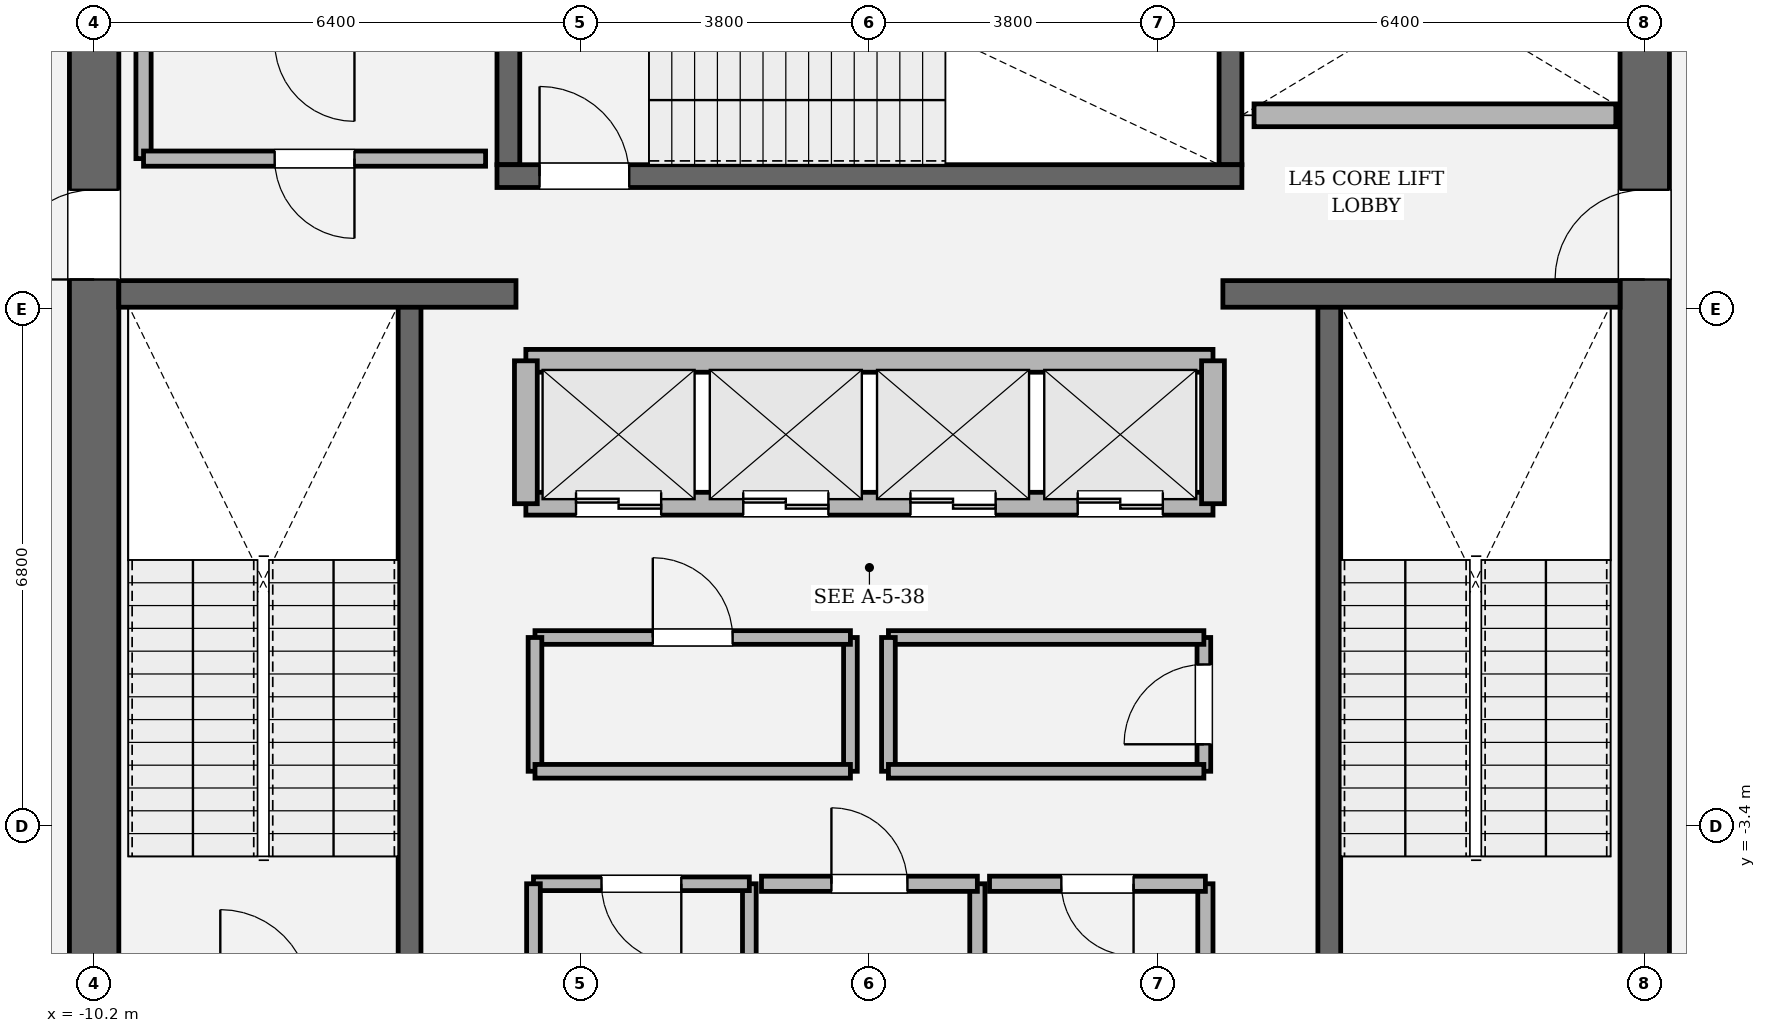
"""IFC4 building model, lengths in metres.
Left out: names, types, materials, properties, quantities, classifications, styles, units other than length and angle.
Written with IfcOpenShell. Run it as: python <this file> out.ifc"""

import sys

from ifc_helpers import new_model, si_unit, direction, frame, frame_2d, origin, place, context, subcontext, project, spatial, rectangle, extrude, element, fill, save


model = new_model("IFC4")
c1 = context("Model", 3, precision=1e-05, world=origin(), true_north=direction((0.0, 1.0)))
c2 = subcontext(c1, "Body", "Model", "MODEL_VIEW")
j1 = project(units=[si_unit("LENGTHUNIT", "METRE"), si_unit("PLANEANGLEUNIT", "RADIAN")], contexts=[c1])
p1 = place(None, origin())
s1 = spatial("IfcSite", under=j1, at=p1, CompositionType="ELEMENT")
p2 = place(p1, origin())
s2 = spatial("IfcBuilding", under=s1, at=p2, CompositionType="ELEMENT")
p3 = place(p2, frame((0.0, 0.0, 192.45)))
s3 = spatial("IfcBuildingStorey", under=s2, at=p3, CompositionType="ELEMENT", Elevation=192.45)
p4 = place(p3, frame((-10.2, -8.875, 0.0), z_axis=(0.0, 0.0, 1.0), x_axis=(0.0, 1.0, 0.0)))
e1 = element("IfcWall", 1, at=p4, inside=s3, PredefinedType="SHEAR", context=c2, shape_type="SweptSolid", body=[
    extrude(rectangle(XDim=17.75, YDim=0.65, at=frame_2d((8.875, 0.0))), origin(), (0.0, 0.0, 1.0), 4.05),
])
p5 = place(p4, frame((12.665, 0.0, 0.0)))
e2 = element("IfcOpeningElement", 2, at=p5, cuts=e1, PredefinedType="OPENING", context=c2, shape_type="SweptSolid", body=[
    extrude(rectangle(XDim=1.18, YDim=2.2, at=frame_2d((0.59, 1.1))), frame((0.0, 0.335, 0.0), z_axis=(0.0, -1.0, 0.0), x_axis=(1.0, 0.0, 0.0)), (0.0, 0.0, 1.0), 0.67),
])
p6 = place(p3, frame((10.2, 8.875, 0.0), z_axis=(0.0, 0.0, 1.0), x_axis=(0.0, -1.0, 0.0)))
e3 = element("IfcWall", 3, at=p6, inside=s3, PredefinedType="SHEAR", context=c2, shape_type="SweptSolid", body=[
    extrude(rectangle(XDim=17.75, YDim=0.65, at=frame_2d((8.875, 0.0))), origin(), (0.0, 0.0, 1.0), 4.05),
])
p7 = place(p6, frame((3.905, 0.0, 0.0)))
e4 = element("IfcOpeningElement", 4, at=p7, cuts=e3, PredefinedType="OPENING", context=c2, shape_type="SweptSolid", body=[
    extrude(rectangle(XDim=1.18, YDim=2.2, at=frame_2d((0.59, 1.1))), frame((0.0, 0.335, 0.0), z_axis=(0.0, -1.0, 0.0), x_axis=(1.0, 0.0, 0.0)), (0.0, 0.0, 1.0), 0.67),
])
for number, where, z_axis, x_axis in (
    (5, (-6.05, -5.5, 0.0), (0.0, 0.0, 1.0), (0.0, 1.0, 0.0)),
    (6, (6.05, 3.45, 0.0), (0.0, 0.0, 1.0), (0.0, -1.0, 0.0)),
):
    element("IfcWall", number, at=place(p3, frame(where, z_axis=z_axis, x_axis=x_axis)), inside=s3, PredefinedType="SOLIDWALL", context=c2, shape_type="SweptSolid", body=[
        extrude(rectangle(XDim=8.95, YDim=0.3, at=frame_2d((4.475, 0.0))), origin(), (0.0, 0.0, 1.0), 4.05),
    ])
for number, where, z_axis, x_axis in (
    (7, (-4.75, 5.3, 0.0), (0.0, 0.0, 1.0), (0.0, 1.0, 0.0)),
    (8, (4.75, 8.875, 0.0), (0.0, 0.0, 1.0), (0.0, -1.0, 0.0)),
):
    element("IfcWall", number, at=place(p3, frame(where, z_axis=z_axis, x_axis=x_axis)), inside=s3, PredefinedType="SOLIDWALL", context=c2, shape_type="SweptSolid", body=[
        extrude(rectangle(XDim=3.575, YDim=0.3, at=frame_2d((1.788, 0.0))), origin(), (0.0, 0.0, 1.0), 4.05),
    ])
p8 = place(p3, frame((-4.9, 5.15, 0.0), z_axis=(0.0, 0.0, 1.0), x_axis=(1.0, 0.0, 0.0)))
e9 = element("IfcWall", 9, at=p8, inside=s3, PredefinedType="SOLIDWALL", context=c2, shape_type="SweptSolid", body=[
    extrude(rectangle(XDim=9.8, YDim=0.3, at=frame_2d((4.9, 0.0))), origin(), (0.0, 0.0, 1.0), 4.05),
])
p9 = place(p8, frame((0.56, 0.0, 0.0)))
e10 = element("IfcOpeningElement", 10, at=p9, cuts=e9, PredefinedType="OPENING", context=c2, shape_type="SweptSolid", body=[
    extrude(rectangle(XDim=1.18, YDim=2.2, at=frame_2d((0.59, 1.1))), frame((0.0, 0.16, 0.0), z_axis=(0.0, -1.0, 0.0), x_axis=(1.0, 0.0, 0.0)), (0.0, 0.0, 1.0), 0.32),
])
for number, where, z_axis, x_axis in (
    (11, (-9.875, 3.6, 0.0), (0.0, 0.0, 1.0), (1.0, 0.0, 0.0)),
    (12, (4.65, 3.6, 0.0), (0.0, 0.0, 1.0), (1.0, 0.0, 0.0)),
):
    element("IfcWall", number, at=place(p3, frame(where, z_axis=z_axis, x_axis=x_axis)), inside=s3, PredefinedType="SOLIDWALL", context=c2, shape_type="SweptSolid", body=[
        extrude(rectangle(XDim=5.225, YDim=0.35, at=frame_2d((2.613, 0.0))), origin(), (0.0, 0.0, 1.0), 4.05),
    ])
p10 = place(p3, frame((-4.52, 0.84, 0.0), z_axis=(0.0, 0.0, 1.0), x_axis=(1.0, 0.0, 0.0)))
e13 = element("IfcWall", 13, at=p10, inside=s3, PredefinedType="SOLIDWALL", context=c2, shape_type="SweptSolid", body=[
    extrude(rectangle(XDim=9.04, YDim=0.3, at=frame_2d((4.52, 0.0))), origin(), (0.0, 0.0, 1.0), 3.83),
])
p11 = place(p10, frame((0.66, 0.0, 0.0)))
e14 = element("IfcOpeningElement", 14, at=p11, cuts=e13, PredefinedType="OPENING", context=c2, shape_type="SweptSolid", body=[
    extrude(rectangle(XDim=1.12, YDim=2.25, at=frame_2d((0.56, 1.125))), frame((0.0, 0.16, 0.0), z_axis=(0.0, -1.0, 0.0), x_axis=(1.0, 0.0, 0.0)), (0.0, 0.0, 1.0), 0.32),
])
p12 = place(p10, frame((2.86, 0.0, 0.0)))
e15 = element("IfcOpeningElement", 15, at=p12, cuts=e13, PredefinedType="OPENING", context=c2, shape_type="SweptSolid", body=[
    extrude(rectangle(XDim=1.12, YDim=2.25, at=frame_2d((0.56, 1.125))), frame((0.0, 0.16, 0.0), z_axis=(0.0, -1.0, 0.0), x_axis=(1.0, 0.0, 0.0)), (0.0, 0.0, 1.0), 0.32),
])
p13 = place(p10, frame((5.06, 0.0, 0.0)))
e16 = element("IfcOpeningElement", 16, at=p13, cuts=e13, PredefinedType="OPENING", context=c2, shape_type="SweptSolid", body=[
    extrude(rectangle(XDim=1.12, YDim=2.25, at=frame_2d((0.56, 1.125))), frame((0.0, 0.16, 0.0), z_axis=(0.0, -1.0, 0.0), x_axis=(1.0, 0.0, 0.0)), (0.0, 0.0, 1.0), 0.32),
])
p14 = place(p10, frame((7.26, 0.0, 0.0)))
e17 = element("IfcOpeningElement", 17, at=p14, cuts=e13, PredefinedType="OPENING", context=c2, shape_type="SweptSolid", body=[
    extrude(rectangle(XDim=1.12, YDim=2.25, at=frame_2d((0.56, 1.125))), frame((0.0, 0.16, 0.0), z_axis=(0.0, -1.0, 0.0), x_axis=(1.0, 0.0, 0.0)), (0.0, 0.0, 1.0), 0.32),
])
p15 = place(p3, frame((-4.52, 2.72, 0.0), z_axis=(0.0, 0.0, 1.0), x_axis=(1.0, 0.0, 0.0)))
e18 = element("IfcWall", 18, at=p15, inside=s3, PredefinedType="SOLIDWALL", context=c2, shape_type="SweptSolid", body=[
    extrude(rectangle(XDim=9.04, YDim=0.3, at=frame_2d((4.52, 0.0))), origin(), (0.0, 0.0, 1.0), 3.83),
])
for number, where, z_axis, x_axis in (
    (19, (-4.52, 0.84, 0.0), (0.0, 0.0, 1.0), (0.0, 1.0, 0.0)),
    (20, (4.52, 0.84, 0.0), (0.0, 0.0, 1.0), (0.0, 1.0, 0.0)),
):
    element("IfcWall", number, at=place(p3, frame(where, z_axis=z_axis, x_axis=x_axis)), inside=s3, PredefinedType="SOLIDWALL", context=c2, shape_type="SweptSolid", body=[
        extrude(rectangle(XDim=1.88, YDim=0.3, at=frame_2d((0.94, 0.0))), origin(), (0.0, 0.0, 1.0), 3.83),
    ])
p16 = place(p3, frame((5.06, 5.95, 0.0), z_axis=(0.0, 0.0, 1.0), x_axis=(1.0, 0.0, 0.0)))
e21 = element("IfcWall", 21, at=p16, inside=s3, PredefinedType="SOLIDWALL", context=c2, shape_type="SweptSolid", body=[
    extrude(rectangle(XDim=4.76, YDim=0.3, at=frame_2d((2.38, 0.0))), origin(), (0.0, 0.0, 1.0), 3.83),
])
p17 = place(p3, frame((-1.58, -5.9, 0.0), z_axis=(0.0, 0.0, 1.0), x_axis=(0.0, 1.0, 0.0)))
e22 = element("IfcWall", 22, at=p17, inside=s3, PredefinedType="PARTITIONING", context=c2, shape_type="SweptSolid", body=[
    extrude(rectangle(XDim=1.74, YDim=0.18, at=frame_2d((0.87, 0.0))), origin(), (0.0, 0.0, 1.0), 3.83),
])
p18 = place(p3, frame((-1.58, -4.16, 0.0), z_axis=(0.0, 0.0, 1.0), x_axis=(-1.0, 0.0, 0.0)))
e23 = element("IfcWall", 23, at=p18, inside=s3, PredefinedType="PARTITIONING", context=c2, shape_type="SweptSolid", body=[
    extrude(rectangle(XDim=2.84, YDim=0.18, at=frame_2d((1.42, 0.0))), origin(), (0.0, 0.0, 1.0), 3.83),
])
p19 = place(p18, frame((0.895, 0.0, 0.0)))
e24 = element("IfcOpeningElement", 24, at=p19, cuts=e23, PredefinedType="OPENING", context=c2, shape_type="SweptSolid", body=[
    extrude(rectangle(XDim=1.05, YDim=2.2, at=frame_2d((0.525, 1.1))), frame((0.0, 0.1, 0.0), z_axis=(0.0, -1.0, 0.0), x_axis=(1.0, 0.0, 0.0)), (0.0, 0.0, 1.0), 0.2),
])
p20 = place(p3, frame((-4.42, -4.16, 0.0), z_axis=(0.0, 0.0, 1.0), x_axis=(0.0, -1.0, 0.0)))
e25 = element("IfcWall", 25, at=p20, inside=s3, PredefinedType="PARTITIONING", context=c2, shape_type="SweptSolid", body=[
    extrude(rectangle(XDim=1.74, YDim=0.18, at=frame_2d((0.87, 0.0))), origin(), (0.0, 0.0, 1.0), 3.83),
])
p21 = place(p3, frame((1.42, -5.9, 0.0), z_axis=(0.0, 0.0, 1.0), x_axis=(0.0, 1.0, 0.0)))
e26 = element("IfcWall", 26, at=p21, inside=s3, PredefinedType="SOLIDWALL", context=c2, shape_type="SweptSolid", body=[
    extrude(rectangle(XDim=1.74, YDim=0.2, at=frame_2d((0.87, 0.0))), origin(), (0.0, 0.0, 1.0), 3.83),
])
p22 = place(p3, frame((1.42, -4.16, 0.0), z_axis=(0.0, 0.0, 1.0), x_axis=(-1.0, 0.0, 0.0)))
e27 = element("IfcWall", 27, at=p22, inside=s3, PredefinedType="SOLIDWALL", context=c2, shape_type="SweptSolid", body=[
    extrude(rectangle(XDim=2.84, YDim=0.2, at=frame_2d((1.42, 0.0))), origin(), (0.0, 0.0, 1.0), 3.83),
])
p23 = place(p22, frame((0.92, 0.0, 0.0)))
e28 = element("IfcOpeningElement", 28, at=p23, cuts=e27, PredefinedType="OPENING", context=c2, shape_type="SweptSolid", body=[
    extrude(rectangle(XDim=1.0, YDim=2.15, at=frame_2d((0.5, 1.075))), frame((0.0, 0.11, 0.0), z_axis=(0.0, -1.0, 0.0), x_axis=(1.0, 0.0, 0.0)), (0.0, 0.0, 1.0), 0.22),
])
p24 = place(p3, frame((4.42, -5.9, 0.0), z_axis=(0.0, 0.0, 1.0), x_axis=(0.0, 1.0, 0.0)))
e29 = element("IfcWall", 29, at=p24, inside=s3, PredefinedType="SOLIDWALL", context=c2, shape_type="SweptSolid", body=[
    extrude(rectangle(XDim=1.74, YDim=0.2, at=frame_2d((0.87, 0.0))), origin(), (0.0, 0.0, 1.0), 3.83),
])
p25 = place(p3, frame((4.42, -4.16, 0.0), z_axis=(0.0, 0.0, 1.0), x_axis=(-1.0, 0.0, 0.0)))
e30 = element("IfcWall", 30, at=p25, inside=s3, PredefinedType="SOLIDWALL", context=c2, shape_type="SweptSolid", body=[
    extrude(rectangle(XDim=2.84, YDim=0.2, at=frame_2d((1.42, 0.0))), origin(), (0.0, 0.0, 1.0), 3.83),
])
p26 = place(p25, frame((0.945, 0.0, 0.0)))
e31 = element("IfcOpeningElement", 31, at=p26, cuts=e30, PredefinedType="OPENING", context=c2, shape_type="SweptSolid", body=[
    extrude(rectangle(XDim=0.95, YDim=2.15, at=frame_2d((0.475, 1.075))), frame((0.0, 0.11, 0.0), z_axis=(0.0, -1.0, 0.0), x_axis=(1.0, 0.0, 0.0)), (0.0, 0.0, 1.0), 0.22),
])
p27 = place(p3, frame((-0.25, -2.68, 0.0), z_axis=(0.0, 0.0, 1.0), x_axis=(0.0, 1.0, 0.0)))
e32 = element("IfcWall", 32, at=p27, inside=s3, PredefinedType="PARTITIONING", context=c2, shape_type="SweptSolid", body=[
    extrude(rectangle(XDim=1.76, YDim=0.18, at=frame_2d((0.88, 0.0))), origin(), (0.0, 0.0, 1.0), 3.83),
])
p28 = place(p3, frame((-0.25, -0.92, 0.0), z_axis=(0.0, 0.0, 1.0), x_axis=(-1.0, 0.0, 0.0)))
e33 = element("IfcWall", 33, at=p28, inside=s3, PredefinedType="PARTITIONING", context=c2, shape_type="SweptSolid", body=[
    extrude(rectangle(XDim=4.15, YDim=0.18, at=frame_2d((2.075, 0.0))), origin(), (0.0, 0.0, 1.0), 3.83),
])
p29 = place(p28, frame((1.55, 0.0, 0.0)))
e34 = element("IfcOpeningElement", 34, at=p29, cuts=e33, PredefinedType="OPENING", context=c2, shape_type="SweptSolid", body=[
    extrude(rectangle(XDim=1.05, YDim=2.2, at=frame_2d((0.525, 1.1))), frame((0.0, 0.1, 0.0), z_axis=(0.0, -1.0, 0.0), x_axis=(1.0, 0.0, 0.0)), (0.0, 0.0, 1.0), 0.2),
])
p30 = place(p3, frame((-4.4, -0.92, 0.0), z_axis=(0.0, 0.0, 1.0), x_axis=(0.0, -1.0, 0.0)))
e35 = element("IfcWall", 35, at=p30, inside=s3, PredefinedType="PARTITIONING", context=c2, shape_type="SweptSolid", body=[
    extrude(rectangle(XDim=1.76, YDim=0.18, at=frame_2d((0.88, 0.0))), origin(), (0.0, 0.0, 1.0), 3.83),
])
p31 = place(p3, frame((-4.4, -2.68, 0.0), z_axis=(0.0, 0.0, 1.0), x_axis=(1.0, 0.0, 0.0)))
e36 = element("IfcWall", 36, at=p31, inside=s3, PredefinedType="PARTITIONING", context=c2, shape_type="SweptSolid", body=[
    extrude(rectangle(XDim=4.15, YDim=0.18, at=frame_2d((2.075, 0.0))), origin(), (0.0, 0.0, 1.0), 3.83),
])
p32 = place(p3, frame((4.4, -2.68, 0.0), z_axis=(0.0, 0.0, 1.0), x_axis=(0.0, 1.0, 0.0)))
e37 = element("IfcWall", 37, at=p32, inside=s3, PredefinedType="PARTITIONING", context=c2, shape_type="SweptSolid", body=[
    extrude(rectangle(XDim=1.76, YDim=0.18, at=frame_2d((0.88, 0.0))), origin(), (0.0, 0.0, 1.0), 3.83),
])
p33 = place(p32, frame((0.355, 0.0, 0.0)))
e38 = element("IfcOpeningElement", 38, at=p33, cuts=e37, PredefinedType="OPENING", context=c2, shape_type="SweptSolid", body=[
    extrude(rectangle(XDim=1.05, YDim=2.2, at=frame_2d((0.525, 1.1))), frame((0.0, 0.1, 0.0), z_axis=(0.0, -1.0, 0.0), x_axis=(1.0, 0.0, 0.0)), (0.0, 0.0, 1.0), 0.2),
])
p34 = place(p3, frame((4.4, -0.92, 0.0), z_axis=(0.0, 0.0, 1.0), x_axis=(-1.0, 0.0, 0.0)))
e39 = element("IfcWall", 39, at=p34, inside=s3, PredefinedType="PARTITIONING", context=c2, shape_type="SweptSolid", body=[
    extrude(rectangle(XDim=4.15, YDim=0.18, at=frame_2d((2.075, 0.0))), origin(), (0.0, 0.0, 1.0), 3.83),
])
p35 = place(p3, frame((0.25, -0.92, 0.0), z_axis=(0.0, 0.0, 1.0), x_axis=(0.0, -1.0, 0.0)))
e40 = element("IfcWall", 40, at=p35, inside=s3, PredefinedType="PARTITIONING", context=c2, shape_type="SweptSolid", body=[
    extrude(rectangle(XDim=1.76, YDim=0.18, at=frame_2d((0.88, 0.0))), origin(), (0.0, 0.0, 1.0), 3.83),
])
p36 = place(p3, frame((0.25, -2.68, 0.0), z_axis=(0.0, 0.0, 1.0), x_axis=(1.0, 0.0, 0.0)))
e41 = element("IfcWall", 41, at=p36, inside=s3, PredefinedType="PARTITIONING", context=c2, shape_type="SweptSolid", body=[
    extrude(rectangle(XDim=4.15, YDim=0.18, at=frame_2d((2.075, 0.0))), origin(), (0.0, 0.0, 1.0), 3.83),
])
p37 = place(p3, frame((-9.55, 6.92, 0.0), z_axis=(0.0, 0.0, 1.0), x_axis=(0.0, -1.0, 0.0)))
e42 = element("IfcWall", 42, at=p37, inside=s3, PredefinedType="SOLIDWALL", context=c2, shape_type="SweptSolid", body=[
    extrude(rectangle(XDim=1.54, YDim=0.2, at=frame_2d((0.77, 0.0))), origin(), (0.0, 0.0, 1.0), 3.83),
])
p38 = place(p3, frame((-9.55, 5.38, 0.0), z_axis=(0.0, 0.0, 1.0), x_axis=(1.0, 0.0, 0.0)))
e43 = element("IfcWall", 43, at=p38, inside=s3, PredefinedType="SOLIDWALL", context=c2, shape_type="SweptSolid", body=[
    extrude(rectangle(XDim=4.5, YDim=0.2, at=frame_2d((2.25, 0.0))), origin(), (0.0, 0.0, 1.0), 3.83),
])
p39 = place(p38, frame((1.725, 0.0, 0.0)))
e44 = element("IfcOpeningElement", 44, at=p39, cuts=e43, PredefinedType="OPENING", context=c2, shape_type="SweptSolid", body=[
    extrude(rectangle(XDim=1.05, YDim=2.2, at=frame_2d((0.525, 1.1))), frame((0.0, 0.11, 0.0), z_axis=(0.0, -1.0, 0.0), x_axis=(1.0, 0.0, 0.0)), (0.0, 0.0, 1.0), 0.22),
])
p40 = place(p9, origin())
e45 = element("IfcDoor", 45, at=p40, inside=s3, OperationType="SINGLE_SWING_LEFT", PredefinedType="DOOR", context=c2, shape_type="SweptSolid", body=[
    extrude(rectangle(XDim=1.18, YDim=2.2, at=frame_2d((0.59, 1.1))), frame((0.0, 0.025, 0.0), z_axis=(0.0, -1.0, 0.0), x_axis=(1.0, 0.0, 0.0)), (0.0, 0.0, 1.0), 0.05),
])
fill(e10, e45)
p41 = place(p5, origin())
e46 = element("IfcDoor", 46, at=p41, inside=s3, OperationType="SINGLE_SWING_LEFT", PredefinedType="DOOR", context=c2, shape_type="SweptSolid", body=[
    extrude(rectangle(XDim=1.18, YDim=2.2, at=frame_2d((0.59, 1.1))), frame((0.0, 0.025, 0.0), z_axis=(0.0, -1.0, 0.0), x_axis=(1.0, 0.0, 0.0)), (0.0, 0.0, 1.0), 0.05),
])
fill(e2, e46)
p42 = place(p7, origin())
e47 = element("IfcDoor", 47, at=p42, inside=s3, OperationType="SINGLE_SWING_RIGHT", PredefinedType="DOOR", context=c2, shape_type="SweptSolid", body=[
    extrude(rectangle(XDim=1.18, YDim=2.2, at=frame_2d((0.59, 1.1))), frame((0.0, 0.025, 0.0), z_axis=(0.0, -1.0, 0.0), x_axis=(1.0, 0.0, 0.0)), (0.0, 0.0, 1.0), 0.05),
])
fill(e4, e47)
p43 = place(p11, origin())
e48 = element("IfcDoor", 48, at=p43, inside=s3, OperationType="DOUBLE_DOOR_SLIDING", PredefinedType="DOOR", context=c2, shape_type="SweptSolid", body=[
    extrude(rectangle(XDim=1.12, YDim=2.25, at=frame_2d((0.56, 1.125))), frame((0.0, 0.025, 0.0), z_axis=(0.0, -1.0, 0.0), x_axis=(1.0, 0.0, 0.0)), (0.0, 0.0, 1.0), 0.05),
])
fill(e14, e48)
p44 = place(p12, origin())
e49 = element("IfcDoor", 49, at=p44, inside=s3, OperationType="DOUBLE_DOOR_SLIDING", PredefinedType="DOOR", context=c2, shape_type="SweptSolid", body=[
    extrude(rectangle(XDim=1.12, YDim=2.25, at=frame_2d((0.56, 1.125))), frame((0.0, 0.025, 0.0), z_axis=(0.0, -1.0, 0.0), x_axis=(1.0, 0.0, 0.0)), (0.0, 0.0, 1.0), 0.05),
])
fill(e15, e49)
p45 = place(p13, origin())
e50 = element("IfcDoor", 50, at=p45, inside=s3, OperationType="DOUBLE_DOOR_SLIDING", PredefinedType="DOOR", context=c2, shape_type="SweptSolid", body=[
    extrude(rectangle(XDim=1.12, YDim=2.25, at=frame_2d((0.56, 1.125))), frame((0.0, 0.025, 0.0), z_axis=(0.0, -1.0, 0.0), x_axis=(1.0, 0.0, 0.0)), (0.0, 0.0, 1.0), 0.05),
])
fill(e16, e50)
p46 = place(p14, origin())
e51 = element("IfcDoor", 51, at=p46, inside=s3, OperationType="DOUBLE_DOOR_SLIDING", PredefinedType="DOOR", context=c2, shape_type="SweptSolid", body=[
    extrude(rectangle(XDim=1.12, YDim=2.25, at=frame_2d((0.56, 1.125))), frame((0.0, 0.025, 0.0), z_axis=(0.0, -1.0, 0.0), x_axis=(1.0, 0.0, 0.0)), (0.0, 0.0, 1.0), 0.05),
])
fill(e17, e51)
p47 = place(p19, origin())
e52 = element("IfcDoor", 52, at=p47, inside=s3, OperationType="SINGLE_SWING_LEFT", PredefinedType="DOOR", context=c2, shape_type="SweptSolid", body=[
    extrude(rectangle(XDim=1.05, YDim=2.2, at=frame_2d((0.525, 1.1))), frame((0.0, 0.025, 0.0), z_axis=(0.0, -1.0, 0.0), x_axis=(1.0, 0.0, 0.0)), (0.0, 0.0, 1.0), 0.05),
])
fill(e24, e52)
p48 = place(p23, origin())
e53 = element("IfcDoor", 53, at=p48, inside=s3, OperationType="SINGLE_SWING_RIGHT", PredefinedType="DOOR", context=c2, shape_type="SweptSolid", body=[
    extrude(rectangle(XDim=1.0, YDim=2.15, at=frame_2d((0.5, 1.075))), frame((0.0, 0.025, 0.0), z_axis=(0.0, -1.0, 0.0), x_axis=(1.0, 0.0, 0.0)), (0.0, 0.0, 1.0), 0.05),
])
fill(e28, e53)
p49 = place(p26, origin())
e54 = element("IfcDoor", 54, at=p49, inside=s3, OperationType="SINGLE_SWING_LEFT", PredefinedType="DOOR", context=c2, shape_type="SweptSolid", body=[
    extrude(rectangle(XDim=0.95, YDim=2.15, at=frame_2d((0.475, 1.075))), frame((0.0, 0.025, 0.0), z_axis=(0.0, -1.0, 0.0), x_axis=(1.0, 0.0, 0.0)), (0.0, 0.0, 1.0), 0.05),
])
fill(e31, e54)
p50 = place(p29, origin())
e55 = element("IfcDoor", 55, at=p50, inside=s3, OperationType="SINGLE_SWING_RIGHT", PredefinedType="DOOR", context=c2, shape_type="SweptSolid", body=[
    extrude(rectangle(XDim=1.05, YDim=2.2, at=frame_2d((0.525, 1.1))), frame((0.0, 0.025, 0.0), z_axis=(0.0, -1.0, 0.0), x_axis=(1.0, 0.0, 0.0)), (0.0, 0.0, 1.0), 0.05),
])
fill(e34, e55)
p51 = place(p33, origin())
e56 = element("IfcDoor", 56, at=p51, inside=s3, OperationType="SINGLE_SWING_LEFT", PredefinedType="DOOR", context=c2, shape_type="SweptSolid", body=[
    extrude(rectangle(XDim=1.05, YDim=2.2, at=frame_2d((0.525, 1.1))), frame((0.0, 0.025, 0.0), z_axis=(0.0, -1.0, 0.0), x_axis=(1.0, 0.0, 0.0)), (0.0, 0.0, 1.0), 0.05),
])
fill(e38, e56)
p52 = place(p39, origin())
e57 = element("IfcDoor", 57, at=p52, inside=s3, OperationType="SINGLE_SWING_RIGHT", PredefinedType="DOOR", context=c2, shape_type="SweptSolid", body=[
    extrude(rectangle(XDim=1.05, YDim=2.2, at=frame_2d((0.525, 1.1))), frame((0.0, 0.025, 0.0), z_axis=(0.0, -1.0, 0.0), x_axis=(1.0, 0.0, 0.0)), (0.0, 0.0, 1.0), 0.05),
])
fill(e44, e57)
save(model, sys.argv[1])
